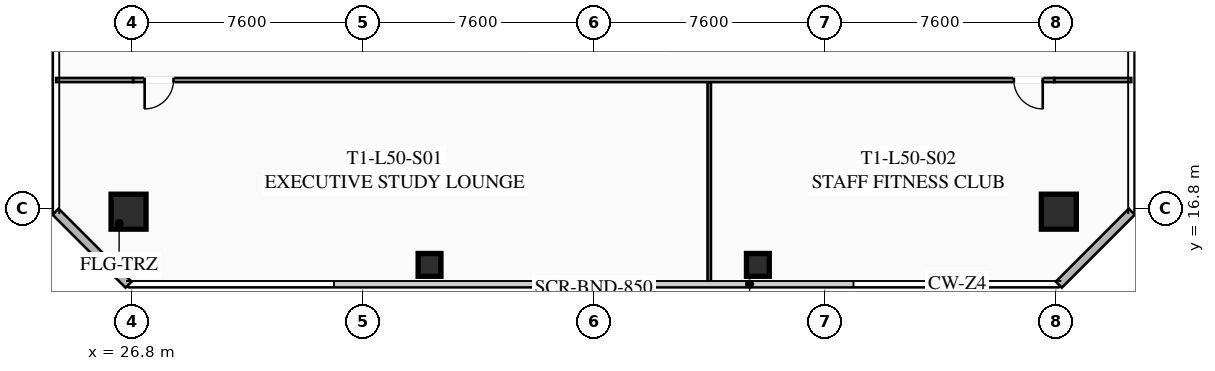
"""IFC4 building model, lengths in metres.
Left out: names, types, materials, properties, quantities, classifications, styles, units other than length and angle.
Written with IfcOpenShell. Run it as: python <this file> out.ifc"""

import sys

from ifc_helpers import new_model, si_unit, direction, frame, frame_2d, origin, origin_2d, place, context, subcontext, project, spatial, rectangle, hollow_rectangle, extrude, element, fill, save


model = new_model("IFC4")
c1 = context("Model", 3, precision=1e-05, world=origin(), true_north=direction((0.0, 1.0)))
c2 = subcontext(c1, "Body", "Model", "MODEL_VIEW")
j1 = project(units=[si_unit("LENGTHUNIT", "METRE"), si_unit("PLANEANGLEUNIT", "RADIAN")], contexts=[c1])
p1 = place(None, origin())
s1 = spatial("IfcSite", under=j1, at=p1, CompositionType="ELEMENT")
p2 = place(p1, origin())
s2 = spatial("IfcBuilding", under=s1, at=p2, CompositionType="ELEMENT")
p3 = place(p2, frame((0.0, 0.0, 185.4)))
s3 = spatial("IfcBuildingStorey", under=s2, at=p3, CompositionType="ELEMENT", Elevation=185.4)
for number, where, z_axis, x_axis in (
    (1, (26.7, 16.7, 0.0), (0.0, 0.0, 1.0), (1.0, 0.0, 0.0)),
    (2, (57.3, 16.7, 0.0), (0.0, 0.0, 1.0), (1.0, 0.0, 0.0)),
):
    element("IfcColumn", number, at=place(p3, frame(where, z_axis=z_axis, x_axis=x_axis)), inside=s3, PredefinedType="COLUMN", context=c2, shape_type="SweptSolid", body=[
        extrude(hollow_rectangle(XDim=1.15, YDim=1.15, WallThickness=0.045, at=origin_2d()), origin(), (0.0, 0.0, 1.0), 3.37),
    ])
for number, where, z_axis, x_axis in (
    (3, (36.6, 14.95, 0.0), (0.0, 0.0, 1.0), (1.0, 0.0, 0.0)),
    (4, (47.4, 14.95, 0.0), (0.0, 0.0, 1.0), (1.0, 0.0, 0.0)),
):
    element("IfcColumn", number, at=place(p3, frame(where, z_axis=z_axis, x_axis=x_axis)), inside=s3, PredefinedType="COLUMN", context=c2, shape_type="SweptSolid", body=[
        extrude(hollow_rectangle(XDim=0.75, YDim=0.75, WallThickness=0.032, at=origin_2d()), origin(), (0.0, 0.0, 1.0), 3.37),
    ])
for number, where, z_axis, x_axis in (
    (5, (26.7, 14.3, 0.0), (0.0, 0.0, 1.0), (-0.707, 0.707, 0.0)),
    (6, (59.7, 16.7, 0.0), (0.0, 0.0, 1.0), (-0.707, -0.707, 0.0)),
):
    element("IfcWall", number, at=place(p3, frame(where, z_axis=z_axis, x_axis=x_axis)), inside=s3, PredefinedType="SOLIDWALL", context=c2, shape_type="SweptSolid", body=[
        extrude(rectangle(XDim=3.394, YDim=0.28, at=frame_2d((1.697, 0.0))), origin(), (0.0, 0.0, 1.0), 3.37),
    ])
p4 = place(p3, frame((57.15, 21.03, 0.0), z_axis=(0.0, 0.0, 1.0), x_axis=(-1.0, 0.0, 0.0)))
e7 = element("IfcWall", 7, at=p4, inside=s3, PredefinedType="PARTITIONING", context=c2, shape_type="SweptSolid", body=[
    extrude(rectangle(XDim=30.3, YDim=0.135, at=frame_2d((15.15, 0.0))), origin(), (0.0, 0.0, 1.0), 2.723),
])
p5 = place(p4, frame((28.97, 0.0, 0.0)))
e8 = element("IfcOpeningElement", 8, at=p5, cuts=e7, PredefinedType="OPENING", context=c2, shape_type="SweptSolid", body=[
    extrude(rectangle(XDim=0.95, YDim=2.05, at=frame_2d((0.475, 1.025))), frame((0.0, 0.077, 0.0), z_axis=(0.0, -1.0, 0.0), x_axis=(1.0, 0.0, 0.0)), (0.0, 0.0, 1.0), 0.155),
])
p6 = place(p4, frame((0.38, 0.0, 0.0)))
e9 = element("IfcOpeningElement", 9, at=p6, cuts=e7, PredefinedType="OPENING", context=c2, shape_type="SweptSolid", body=[
    extrude(rectangle(XDim=0.95, YDim=2.05, at=frame_2d((0.475, 1.025))), frame((0.0, 0.077, 0.0), z_axis=(0.0, -1.0, 0.0), x_axis=(1.0, 0.0, 0.0)), (0.0, 0.0, 1.0), 0.155),
])
for number, where, z_axis, x_axis in (
    (10, (24.32, 21.03, 0.0), (0.0, 0.0, 1.0), (1.0, 0.0, 0.0)),
    (11, (57.15, 21.03, 0.0), (0.0, 0.0, 1.0), (1.0, 0.0, 0.0)),
):
    element("IfcWall", number, at=place(p3, frame(where, z_axis=z_axis, x_axis=x_axis)), inside=s3, PredefinedType="PARTITIONING", context=c2, shape_type="SweptSolid", body=[
        extrude(rectangle(XDim=2.53, YDim=0.135, at=frame_2d((1.265, 0.0))), origin(), (0.0, 0.0, 1.0), 2.723),
    ])
p7 = place(p3, frame((45.8, 14.32, 0.0), z_axis=(0.0, 0.0, 1.0), x_axis=(0.0, 1.0, 0.0)))
e12 = element("IfcWall", 12, at=p7, inside=s3, PredefinedType="PARTITIONING", context=c2, shape_type="SweptSolid", body=[
    extrude(rectangle(XDim=6.63, YDim=0.11, at=frame_2d((3.315, 0.0))), origin(), (0.0, 0.0, 1.0), 2.723),
])
p8 = place(p5, origin())
e13 = element("IfcDoor", 13, at=p8, inside=s3, OperationType="SINGLE_SWING_RIGHT", PredefinedType="DOOR", context=c2, shape_type="SweptSolid", body=[
    extrude(rectangle(XDim=0.95, YDim=2.05, at=frame_2d((0.475, 1.025))), frame((0.0, 0.025, 0.0), z_axis=(0.0, -1.0, 0.0), x_axis=(1.0, 0.0, 0.0)), (0.0, 0.0, 1.0), 0.05),
])
fill(e8, e13)
p9 = place(p6, origin())
e14 = element("IfcDoor", 14, at=p9, inside=s3, OperationType="SINGLE_SWING_LEFT", PredefinedType="DOOR", context=c2, shape_type="SweptSolid", body=[
    extrude(rectangle(XDim=0.95, YDim=2.05, at=frame_2d((0.475, 1.025))), frame((0.0, 0.025, 0.0), z_axis=(0.0, -1.0, 0.0), x_axis=(1.0, 0.0, 0.0)), (0.0, 0.0, 1.0), 0.05),
])
fill(e9, e14)
save(model, sys.argv[1])
